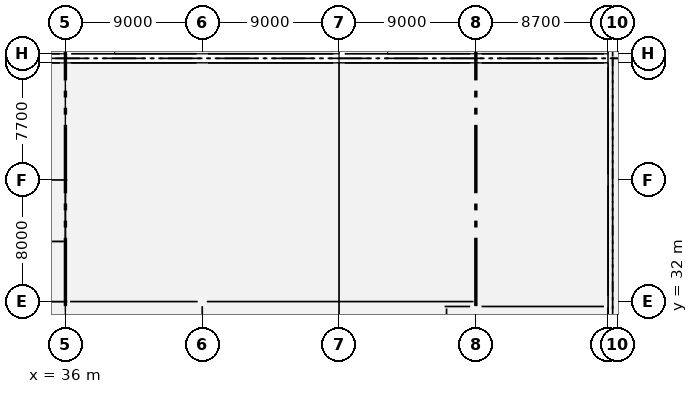
"""IFC4 building model, lengths in metres.
Left out: names, types, materials, properties, quantities, classifications, styles, units other than length and angle.
Written with IfcOpenShell. Run it as: python <this file> out.ifc"""

import sys

from ifc_helpers import new_model, si_unit, direction, frame, frame_2d, origin, origin_2d, place, context, subcontext, project, spatial, rectangle, extrude, element, fill, save


model = new_model("IFC4")
c1 = context("Model", 3, precision=1e-05, world=origin(), true_north=direction((0.0, 1.0)))
c2 = subcontext(c1, "Body", "Model", "MODEL_VIEW")
j1 = project(units=[si_unit("LENGTHUNIT", "METRE"), si_unit("PLANEANGLEUNIT", "RADIAN")], contexts=[c1])
p1 = place(None, origin())
s1 = spatial("IfcSite", under=j1, at=p1, CompositionType="ELEMENT")
p2 = place(p1, origin())
s2 = spatial("IfcBuilding", under=s1, at=p2, CompositionType="ELEMENT")
p3 = place(p2, origin())
s3 = spatial("IfcBuildingStorey", under=s2, at=p3, CompositionType="ELEMENT", Elevation=0.0)
for number, where, z_axis, x_axis in (
    (1, (36.0, 32.0, -0.5), (0.0, 0.0, 1.0), (1.0, 0.0, 0.0)),
    (2, (36.0, 40.0, -0.5), (0.0, 0.0, 1.0), (1.0, 0.0, 0.0)),
):
    element("IfcColumn", number, at=place(p3, frame(where, z_axis=z_axis, x_axis=x_axis)), inside=s3, PredefinedType="COLUMN", context=c2, shape_type="SweptSolid", body=[
        extrude(rectangle(XDim=0.75, YDim=0.75, at=origin_2d()), origin(), (0.0, 0.0, 1.0), 6.8),
    ])
for number, where, z_axis, x_axis in (
    (3, (36.0, 47.7, -0.5), (0.0, 0.0, 1.0), (1.0, 0.0, 0.0)),
    (4, (36.0, 48.3, -0.5), (0.0, 0.0, 1.0), (1.0, 0.0, 0.0)),
):
    element("IfcColumn", number, at=place(p3, frame(where, z_axis=z_axis, x_axis=x_axis)), inside=s3, PredefinedType="COLUMN", context=c2, shape_type="SweptSolid", body=[
        extrude(rectangle(XDim=0.75, YDim=0.55, at=origin_2d()), origin(), (0.0, 0.0, 1.0), 6.8),
    ])
for number, where, z_axis, x_axis in (
    (5, (45.0, 32.0, -0.5), (0.0, 0.0, 1.0), (1.0, 0.0, 0.0)),
    (6, (45.0, 40.0, -0.5), (0.0, 0.0, 1.0), (1.0, 0.0, 0.0)),
):
    element("IfcColumn", number, at=place(p3, frame(where, z_axis=z_axis, x_axis=x_axis)), inside=s3, PredefinedType="COLUMN", context=c2, shape_type="SweptSolid", body=[
        extrude(rectangle(XDim=0.75, YDim=0.75, at=origin_2d()), origin(), (0.0, 0.0, 1.0), 6.8),
    ])
for number, where, z_axis, x_axis in (
    (7, (45.0, 47.7, -0.5), (0.0, 0.0, 1.0), (1.0, 0.0, 0.0)),
    (8, (45.0, 48.3, -0.5), (0.0, 0.0, 1.0), (1.0, 0.0, 0.0)),
):
    element("IfcColumn", number, at=place(p3, frame(where, z_axis=z_axis, x_axis=x_axis)), inside=s3, PredefinedType="COLUMN", context=c2, shape_type="SweptSolid", body=[
        extrude(rectangle(XDim=0.75, YDim=0.55, at=origin_2d()), origin(), (0.0, 0.0, 1.0), 6.8),
    ])
for number, where, z_axis, x_axis in (
    (9, (54.0, 32.0, -0.5), (0.0, 0.0, 1.0), (1.0, 0.0, 0.0)),
    (10, (54.0, 40.0, -0.5), (0.0, 0.0, 1.0), (1.0, 0.0, 0.0)),
):
    element("IfcColumn", number, at=place(p3, frame(where, z_axis=z_axis, x_axis=x_axis)), inside=s3, PredefinedType="COLUMN", context=c2, shape_type="SweptSolid", body=[
        extrude(rectangle(XDim=0.75, YDim=0.75, at=origin_2d()), origin(), (0.0, 0.0, 1.0), 6.8),
    ])
for number, where, z_axis, x_axis in (
    (11, (54.0, 47.7, -0.5), (0.0, 0.0, 1.0), (1.0, 0.0, 0.0)),
    (12, (54.0, 48.3, -0.5), (0.0, 0.0, 1.0), (1.0, 0.0, 0.0)),
):
    element("IfcColumn", number, at=place(p3, frame(where, z_axis=z_axis, x_axis=x_axis)), inside=s3, PredefinedType="COLUMN", context=c2, shape_type="SweptSolid", body=[
        extrude(rectangle(XDim=0.75, YDim=0.55, at=origin_2d()), origin(), (0.0, 0.0, 1.0), 6.8),
    ])
for number, where, z_axis, x_axis in (
    (13, (63.0, 32.0, -0.5), (0.0, 0.0, 1.0), (1.0, 0.0, 0.0)),
    (14, (63.0, 40.0, -0.5), (0.0, 0.0, 1.0), (1.0, 0.0, 0.0)),
):
    element("IfcColumn", number, at=place(p3, frame(where, z_axis=z_axis, x_axis=x_axis)), inside=s3, PredefinedType="COLUMN", context=c2, shape_type="SweptSolid", body=[
        extrude(rectangle(XDim=0.75, YDim=0.75, at=origin_2d()), origin(), (0.0, 0.0, 1.0), 6.8),
    ])
for number, where, z_axis, x_axis in (
    (15, (63.0, 47.7, -0.5), (0.0, 0.0, 1.0), (1.0, 0.0, 0.0)),
    (16, (63.0, 48.3, -0.5), (0.0, 0.0, 1.0), (1.0, 0.0, 0.0)),
):
    element("IfcColumn", number, at=place(p3, frame(where, z_axis=z_axis, x_axis=x_axis)), inside=s3, PredefinedType="COLUMN", context=c2, shape_type="SweptSolid", body=[
        extrude(rectangle(XDim=0.75, YDim=0.55, at=origin_2d()), origin(), (0.0, 0.0, 1.0), 6.8),
    ])
for number, where, z_axis, x_axis in (
    (17, (71.7, 32.0, -0.5), (0.0, 0.0, 1.0), (1.0, 0.0, 0.0)),
    (18, (71.7, 40.0, -0.5), (0.0, 0.0, 1.0), (1.0, 0.0, 0.0)),
):
    element("IfcColumn", number, at=place(p3, frame(where, z_axis=z_axis, x_axis=x_axis)), inside=s3, PredefinedType="COLUMN", context=c2, shape_type="SweptSolid", body=[
        extrude(rectangle(XDim=0.55, YDim=0.75, at=origin_2d()), origin(), (0.0, 0.0, 1.0), 6.8),
    ])
for number, where, z_axis, x_axis in (
    (19, (71.7, 47.7, -0.5), (0.0, 0.0, 1.0), (1.0, 0.0, 0.0)),
    (20, (71.7, 48.3, -0.5), (0.0, 0.0, 1.0), (1.0, 0.0, 0.0)),
):
    element("IfcColumn", number, at=place(p3, frame(where, z_axis=z_axis, x_axis=x_axis)), inside=s3, PredefinedType="COLUMN", context=c2, shape_type="SweptSolid", body=[
        extrude(rectangle(XDim=0.55, YDim=0.55, at=origin_2d()), origin(), (0.0, 0.0, 1.0), 6.8),
    ])
for number, where, z_axis, x_axis in (
    (21, (27.375, 47.7, 0.0), (0.0, 0.0, 1.0), (1.0, 0.0, 0.0)),
    (22, (36.375, 47.7, 0.0), (0.0, 0.0, 1.0), (1.0, 0.0, 0.0)),
    (23, (45.375, 47.7, 0.0), (0.0, 0.0, 1.0), (1.0, 0.0, 0.0)),
    (24, (54.375, 47.7, 0.0), (0.0, 0.0, 1.0), (1.0, 0.0, 0.0)),
):
    element("IfcWall", number, at=place(p3, frame(where, z_axis=z_axis, x_axis=x_axis)), inside=s3, PredefinedType="SOLIDWALL", context=c2, shape_type="SweptSolid", body=[
        extrude(rectangle(XDim=8.25, YDim=0.38, at=frame_2d((4.125, 0.0))), origin(), (0.0, 0.0, 1.0), 5.08),
    ])
p4 = place(p3, frame((63.375, 47.7, 0.0), z_axis=(0.0, 0.0, 1.0), x_axis=(1.0, 0.0, 0.0)))
e25 = element("IfcWall", 25, at=p4, inside=s3, PredefinedType="SOLIDWALL", context=c2, shape_type="SweptSolid", body=[
    extrude(rectangle(XDim=8.05, YDim=0.38, at=frame_2d((4.025, 0.0))), origin(), (0.0, 0.0, 1.0), 5.08),
])
p5 = place(p3, frame((71.7, 32.375, 0.0), z_axis=(0.0, 0.0, 1.0), x_axis=(0.0, 1.0, 0.0)))
e26 = element("IfcWall", 26, at=p5, inside=s3, PredefinedType="SOLIDWALL", context=c2, shape_type="SweptSolid", body=[
    extrude(rectangle(XDim=7.25, YDim=0.38, at=frame_2d((3.625, 0.0))), origin(), (0.0, 0.0, 1.0), 5.08),
])
p6 = place(p3, frame((71.7, 40.375, 0.0), z_axis=(0.0, 0.0, 1.0), x_axis=(0.0, 1.0, 0.0)))
e27 = element("IfcWall", 27, at=p6, inside=s3, PredefinedType="SOLIDWALL", context=c2, shape_type="SweptSolid", body=[
    extrude(rectangle(XDim=7.05, YDim=0.38, at=frame_2d((3.525, 0.0))), origin(), (0.0, 0.0, 1.0), 5.08),
])
p7 = place(p3, frame((27.375, 48.3, 0.0), z_axis=(0.0, 0.0, 1.0), x_axis=(1.0, 0.0, 0.0)))
e28 = element("IfcWall", 28, at=p7, inside=s3, PredefinedType="SOLIDWALL", context=c2, shape_type="SweptSolid", body=[
    extrude(rectangle(XDim=8.25, YDim=0.38, at=frame_2d((4.125, 0.0))), origin(), (0.0, 0.0, 1.0), 5.08),
])
p8 = place(p3, frame((36.375, 48.3, 0.0), z_axis=(0.0, 0.0, 1.0), x_axis=(1.0, 0.0, 0.0)))
e29 = element("IfcWall", 29, at=p8, inside=s3, PredefinedType="SOLIDWALL", context=c2, shape_type="SweptSolid", body=[
    extrude(rectangle(XDim=8.25, YDim=0.38, at=frame_2d((4.125, 0.0))), origin(), (0.0, 0.0, 1.0), 5.08),
])
p9 = place(p8, frame((3.325, 0.0, 3.59)))
e30 = element("IfcOpeningElement", 30, at=p9, cuts=e29, PredefinedType="OPENING", context=c2, shape_type="SweptSolid", body=[
    extrude(rectangle(XDim=1.6, YDim=1.45, at=frame_2d((0.8, 0.725))), frame((0.0, 0.2, 0.0), z_axis=(0.0, -1.0, 0.0), x_axis=(1.0, 0.0, 0.0)), (0.0, 0.0, 1.0), 0.4),
])
p10 = place(p3, frame((45.375, 48.3, 0.0), z_axis=(0.0, 0.0, 1.0), x_axis=(1.0, 0.0, 0.0)))
e31 = element("IfcWall", 31, at=p10, inside=s3, PredefinedType="SOLIDWALL", context=c2, shape_type="SweptSolid", body=[
    extrude(rectangle(XDim=8.25, YDim=0.38, at=frame_2d((4.125, 0.0))), origin(), (0.0, 0.0, 1.0), 5.08),
])
p11 = place(p3, frame((54.375, 48.3, 0.0), z_axis=(0.0, 0.0, 1.0), x_axis=(1.0, 0.0, 0.0)))
e32 = element("IfcWall", 32, at=p11, inside=s3, PredefinedType="SOLIDWALL", context=c2, shape_type="SweptSolid", body=[
    extrude(rectangle(XDim=8.25, YDim=0.38, at=frame_2d((4.125, 0.0))), origin(), (0.0, 0.0, 1.0), 5.08),
])
p12 = place(p11, frame((3.325, 0.0, 3.59)))
e33 = element("IfcOpeningElement", 33, at=p12, cuts=e32, PredefinedType="OPENING", context=c2, shape_type="SweptSolid", body=[
    extrude(rectangle(XDim=1.6, YDim=1.45, at=frame_2d((0.8, 0.725))), frame((0.0, 0.2, 0.0), z_axis=(0.0, -1.0, 0.0), x_axis=(1.0, 0.0, 0.0)), (0.0, 0.0, 1.0), 0.4),
])
p13 = place(p3, frame((63.375, 48.3, 0.0), z_axis=(0.0, 0.0, 1.0), x_axis=(1.0, 0.0, 0.0)))
e34 = element("IfcWall", 34, at=p13, inside=s3, PredefinedType="SOLIDWALL", context=c2, shape_type="SweptSolid", body=[
    extrude(rectangle(XDim=8.05, YDim=0.38, at=frame_2d((4.025, 0.0))), origin(), (0.0, 0.0, 1.0), 5.08),
])
for number, where, z_axis, x_axis in (
    (35, (26.875, 32.0, -0.5), (0.0, 0.0, 1.0), (1.0, 0.0, 0.0)),
    (36, (26.875, 40.0, -0.5), (0.0, 0.0, 1.0), (1.0, 0.0, 0.0)),
):
    element("IfcWall", number, at=place(p3, frame(where, z_axis=z_axis, x_axis=x_axis)), inside=s3, PredefinedType="SOLIDWALL", context=c2, shape_type="SweptSolid", body=[
        extrude(rectangle(XDim=9.25, YDim=0.25, at=frame_2d((4.625, 0.0))), origin(), (0.0, 0.0, 1.0), 6.8),
    ])
p14 = place(p3, frame((36.0, 32.125, -0.5), z_axis=(0.0, 0.0, 1.0), x_axis=(0.0, 1.0, 0.0)))
e37 = element("IfcWall", 37, at=p14, inside=s3, PredefinedType="SOLIDWALL", context=c2, shape_type="SweptSolid", body=[
    extrude(rectangle(XDim=7.75, YDim=0.25, at=frame_2d((3.875, 0.0))), origin(), (0.0, 0.0, 1.0), 6.8),
])
p15 = place(p14, frame((4.9, 0.0, 0.5)))
e38 = element("IfcOpeningElement", 38, at=p15, cuts=e37, PredefinedType="OPENING", context=c2, shape_type="SweptSolid", body=[
    extrude(rectangle(XDim=1.6, YDim=2.2, at=frame_2d((0.8, 1.1))), frame((0.0, 0.135, 0.0), z_axis=(0.0, -1.0, 0.0), x_axis=(1.0, 0.0, 0.0)), (0.0, 0.0, 1.0), 0.27),
])
p16 = place(p3, frame((27.125, 35.95, -0.5), z_axis=(0.0, 0.0, 1.0), x_axis=(1.0, 0.0, 0.0)))
e39 = element("IfcWall", 39, at=p16, inside=s3, PredefinedType="SOLIDWALL", context=c2, shape_type="SweptSolid", body=[
    extrude(rectangle(XDim=8.75, YDim=0.25, at=frame_2d((4.375, 0.0))), origin(), (0.0, 0.0, 1.0), 6.8),
])
p17 = place(p3, frame((45.0, 24.45, 0.0), z_axis=(0.0, 0.0, 1.0), x_axis=(0.0, 1.0, 0.0)))
e40 = element("IfcWall", 40, at=p17, inside=s3, PredefinedType="PARTITIONING", context=c2, shape_type="SweptSolid", body=[
    extrude(rectangle(XDim=7.25, YDim=0.165, at=frame_2d((3.625, 0.0))), origin(), (0.0, 0.0, 1.0), 5.33),
])
p18 = place(p3, frame((36.3, 32.0, 0.0), z_axis=(0.0, 0.0, 1.0), x_axis=(1.0, 0.0, 0.0)))
e41 = element("IfcWall", 41, at=p18, inside=s3, PredefinedType="PARTITIONING", context=c2, shape_type="SweptSolid", body=[
    extrude(rectangle(XDim=8.4, YDim=0.225, at=frame_2d((4.2, 0.0))), origin(), (0.0, 0.0, 1.0), 5.13),
])
p19 = place(p3, frame((45.3, 32.0, 0.0), z_axis=(0.0, 0.0, 1.0), x_axis=(1.0, 0.0, 0.0)))
e42 = element("IfcWall", 42, at=p19, inside=s3, PredefinedType="PARTITIONING", context=c2, shape_type="SweptSolid", body=[
    extrude(rectangle(XDim=17.55, YDim=0.2, at=frame_2d((8.775, 0.0))), origin(), (0.0, 0.0, 1.0), 5.13),
])
p20 = place(p3, frame((61.073, 29.45, 0.0), z_axis=(0.0, 0.0, 1.0), x_axis=(0.0, 1.0, 0.0)))
e43 = element("IfcWall", 43, at=p20, inside=s3, PredefinedType="STANDARD", context=c2, shape_type="SweptSolid", body=[
    extrude(rectangle(XDim=2.1, YDim=0.255, at=frame_2d((1.05, 0.0))), origin(), (0.0, 0.0, 1.0), 5.95),
])
p21 = place(p3, frame((60.945, 31.677, 0.0), z_axis=(0.0, 0.0, 1.0), x_axis=(1.0, 0.0, 0.0)))
e44 = element("IfcWall", 44, at=p21, inside=s3, PredefinedType="STANDARD", context=c2, shape_type="SweptSolid", body=[
    extrude(rectangle(XDim=1.68, YDim=0.255, at=frame_2d((0.84, 0.0))), origin(), (0.0, 0.0, 1.0), 5.95),
])
p22 = place(p3, frame((63.375, 31.677, 0.0), z_axis=(0.0, 0.0, 1.0), x_axis=(1.0, 0.0, 0.0)))
e45 = element("IfcWall", 45, at=p22, inside=s3, PredefinedType="STANDARD", context=c2, shape_type="SweptSolid", body=[
    extrude(rectangle(XDim=8.05, YDim=0.255, at=frame_2d((4.025, 0.0))), origin(), (0.0, 0.0, 1.0), 5.95),
])
p23 = place(p3, frame((71.7, 31.625, 0.0), z_axis=(0.0, 0.0, 1.0), x_axis=(0.0, -1.0, 0.0)))
e46 = element("IfcWall", 46, at=p23, inside=s3, PredefinedType="SOLIDWALL", context=c2, shape_type="SweptSolid", body=[
    extrude(rectangle(XDim=1.45, YDim=0.38, at=frame_2d((0.725, 0.0))), origin(), (0.0, 0.0, 1.0), 5.08),
])
p24 = place(p23, frame((0.15, 0.0, 0.0)))
e47 = element("IfcOpeningElement", 47, at=p24, cuts=e46, PredefinedType="OPENING", context=c2, shape_type="SweptSolid", body=[
    extrude(rectangle(XDim=1.2, YDim=2.25, at=frame_2d((0.6, 1.125))), frame((0.0, 0.2, 0.0), z_axis=(0.0, -1.0, 0.0), x_axis=(1.0, 0.0, 0.0)), (0.0, 0.0, 1.0), 0.4),
])
p25 = place(p9, origin())
e48 = element("IfcWindow", 48, at=p25, inside=s3, PartitioningType="DOUBLE_PANEL_HORIZONTAL", PredefinedType="WINDOW", context=c2, shape_type="SweptSolid", body=[
    extrude(rectangle(XDim=1.6, YDim=1.45, at=frame_2d((0.8, 0.725))), frame((0.0, 0.03, 0.0), z_axis=(0.0, -1.0, 0.0), x_axis=(1.0, 0.0, 0.0)), (0.0, 0.0, 1.0), 0.06),
])
fill(e30, e48)
p26 = place(p12, origin())
e49 = element("IfcWindow", 49, at=p26, inside=s3, PartitioningType="DOUBLE_PANEL_HORIZONTAL", PredefinedType="WINDOW", context=c2, shape_type="SweptSolid", body=[
    extrude(rectangle(XDim=1.6, YDim=1.45, at=frame_2d((0.8, 0.725))), frame((0.0, 0.03, 0.0), z_axis=(0.0, -1.0, 0.0), x_axis=(1.0, 0.0, 0.0)), (0.0, 0.0, 1.0), 0.06),
])
fill(e33, e49)
p27 = place(p15, origin())
e50 = element("IfcDoor", 50, at=p27, inside=s3, OperationType="SINGLE_SWING_RIGHT", PredefinedType="DOOR", context=c2, shape_type="SweptSolid", body=[
    extrude(rectangle(XDim=1.6, YDim=2.2, at=frame_2d((0.8, 1.1))), frame((0.0, 0.025, 0.0), z_axis=(0.0, -1.0, 0.0), x_axis=(1.0, 0.0, 0.0)), (0.0, 0.0, 1.0), 0.05),
])
fill(e38, e50)
p28 = place(p24, origin())
e51 = element("IfcDoor", 51, at=p28, inside=s3, OperationType="SINGLE_SWING_LEFT", PredefinedType="DOOR", context=c2, shape_type="SweptSolid", body=[
    extrude(rectangle(XDim=1.2, YDim=2.25, at=frame_2d((0.6, 1.125))), frame((0.0, 0.025, 0.0), z_axis=(0.0, -1.0, 0.0), x_axis=(1.0, 0.0, 0.0)), (0.0, 0.0, 1.0), 0.05),
])
fill(e47, e51)
save(model, sys.argv[1])
